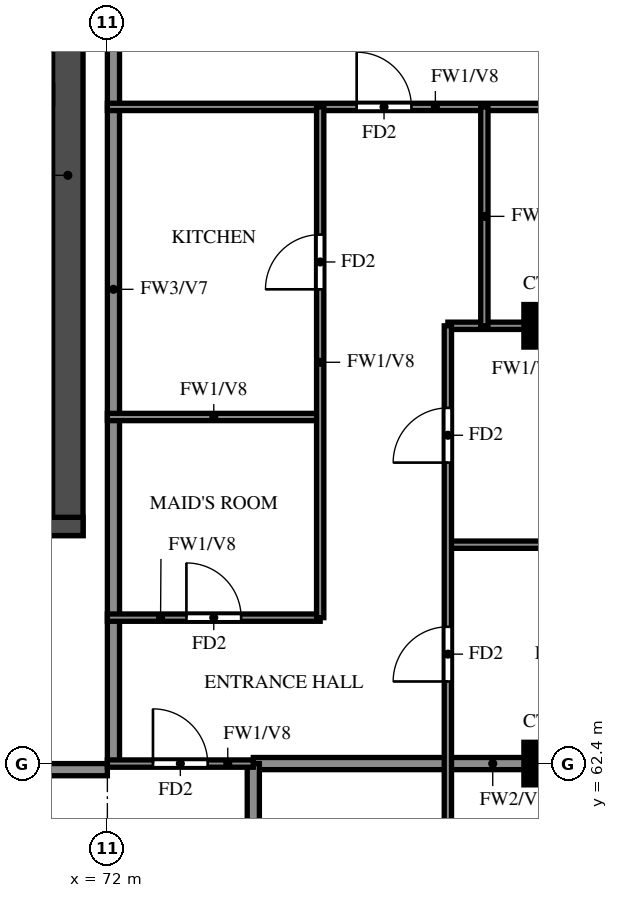
"""IFC4 building model, lengths in metres.
Left out: names, types, materials, properties, quantities, classifications, styles, units other than length and angle.
Written with IfcOpenShell. Run it as: python <this file> out.ifc"""

import sys

from ifc_helpers import new_model, si_unit, direction, frame, frame_2d, origin, origin_2d, place, context, subcontext, project, spatial, rectangle, extrude, source, transform, mapped, element, fill, save


model = new_model("IFC4")
c1 = context("Model", 3, precision=1e-05, world=origin(), true_north=direction((0.0, 1.0)))
c2 = subcontext(c1, "Body", "Model", "MODEL_VIEW")
j1 = project(units=[si_unit("LENGTHUNIT", "METRE"), si_unit("PLANEANGLEUNIT", "RADIAN")], contexts=[c1])
p1 = place(None, origin())
s1 = spatial("IfcSite", under=j1, at=p1, CompositionType="ELEMENT")
p2 = place(p1, origin())
s2 = spatial("IfcBuilding", under=s1, at=p2, CompositionType="ELEMENT")
p3 = place(p2, frame((0.0, 0.0, 267.5)))
s3 = spatial("IfcBuildingStorey", under=s2, at=p3, CompositionType="ELEMENT", Elevation=267.5)
m1 = source(origin(), c2, "Body", "SweptSolid", [
    extrude(rectangle(XDim=0.7, YDim=0.7, at=origin_2d()), origin(), (0.0, 0.0, 1.0), 3.099),
])
for number, where, z_axis, x_axis in (
    (1, (79.2, 62.4, 0.0), (0.0, 0.0, 1.0), (1.0, 0.0, 0.0)),
    (2, (79.2, 69.6, 0.0), (0.0, 0.0, 1.0), (1.0, 0.0, 0.0)),
):
    element("IfcColumn", number, at=place(p3, frame(where, z_axis=z_axis, x_axis=x_axis)), inside=s3, PredefinedType="COLUMN", context=c2, shape_type="MappedRepresentation", body=[
        mapped(m1, transform((0.0, 0.0, 0.0))),
    ])
p4 = place(p3, frame((71.35, 66.15, 0.0), z_axis=(0.0, 0.0, 1.0), x_axis=(0.0, 1.0, 0.0)))
e3 = element("IfcWall", 3, at=p4, inside=s3, PredefinedType="SHEAR", context=c2, shape_type="SweptSolid", body=[
    extrude(rectangle(XDim=11.85, YDim=0.5, at=frame_2d((5.925, 0.0))), origin(), (0.0, 0.0, 1.0), 3.099),
])
p5 = place(p3, frame((29.2, 66.3, 0.0), z_axis=(0.0, 0.0, 1.0), x_axis=(1.0, 0.0, 0.0)))
e4 = element("IfcWall", 4, at=p5, inside=s3, PredefinedType="SHEAR", context=c2, shape_type="SweptSolid", body=[
    extrude(rectangle(XDim=42.4, YDim=0.3, at=frame_2d((21.2, 0.0))), origin(), (0.0, 0.0, 1.0), 3.099),
])
p6 = place(p5, frame((1.425, 0.0, 0.0)))
e5 = element("IfcOpeningElement", 5, at=p6, cuts=e4, PredefinedType="OPENING", context=c2, shape_type="SweptSolid", body=[
    extrude(rectangle(XDim=1.1, YDim=2.1, at=frame_2d((0.55, 1.05))), frame((0.0, 0.16, 0.0), z_axis=(0.0, -1.0, 0.0), x_axis=(1.0, 0.0, 0.0)), (0.0, 0.0, 1.0), 0.32),
])
p7 = place(p5, frame((4.2, 0.0, 0.0)))
e6 = element("IfcOpeningElement", 6, at=p7, cuts=e4, PredefinedType="OPENING", context=c2, shape_type="SweptSolid", body=[
    extrude(rectangle(XDim=1.8, YDim=2.1, at=frame_2d((0.9, 1.05))), frame((0.0, 0.16, 0.0), z_axis=(0.0, -1.0, 0.0), x_axis=(1.0, 0.0, 0.0)), (0.0, 0.0, 1.0), 0.32),
])
p8 = place(p3, frame((67.2, 62.3, 0.0), z_axis=(0.0, 0.0, 1.0), x_axis=(1.0, 0.0, 0.0)))
e7 = element("IfcWall", 7, at=p8, inside=s3, PredefinedType="SOLIDWALL", context=c2, shape_type="SweptSolid", body=[
    extrude(rectangle(XDim=4.8, YDim=0.2, at=frame_2d((2.4, 0.0))), origin(), (0.0, 0.0, 1.0), 3.099),
])
p9 = place(p3, frame((72.1, 62.4, 0.0), z_axis=(0.0, 0.0, 1.0), x_axis=(0.0, 1.0, 0.0)))
e8 = element("IfcWall", 8, at=p9, inside=s3, PredefinedType="SOLIDWALL", context=c2, shape_type="SweptSolid", body=[
    extrude(rectangle(XDim=15.6, YDim=0.2, at=frame_2d((7.8, 0.0))), origin(), (0.0, 0.0, 1.0), 3.099),
])
p10 = place(p3, frame((74.4, 62.4, 0.0), z_axis=(0.0, 0.0, 1.0), x_axis=(1.0, 0.0, 0.0)))
e9 = element("IfcWall", 9, at=p10, inside=s3, PredefinedType="SOLIDWALL", context=c2, shape_type="SweptSolid", body=[
    extrude(rectangle(XDim=7.875, YDim=0.2, at=frame_2d((3.938, 0.0))), origin(), (0.0, 0.0, 1.0), 3.099),
])
p11 = place(p3, frame((74.4, 60.0, 0.0), z_axis=(0.0, 0.0, 1.0), x_axis=(0.0, 1.0, 0.0)))
e10 = element("IfcWall", 10, at=p11, inside=s3, PredefinedType="SOLIDWALL", context=c2, shape_type="SweptSolid", body=[
    extrude(rectangle(XDim=2.4, YDim=0.2, at=frame_2d((1.2, 0.0))), origin(), (0.0, 0.0, 1.0), 3.099),
])
p12 = place(p3, frame((72.0, 62.4, 0.0), z_axis=(0.0, 0.0, 1.0), x_axis=(1.0, 0.0, 0.0)))
e11 = element("IfcWall", 11, at=p12, inside=s3, PredefinedType="PARTITIONING", context=c2, shape_type="SweptSolid", body=[
    extrude(rectangle(XDim=2.4, YDim=0.12, at=frame_2d((1.2, 0.0))), origin(), (0.0, 0.0, 1.0), 3.099),
])
p13 = place(p12, frame((0.75, 0.0, 0.0)))
e12 = element("IfcOpeningElement", 12, at=p13, cuts=e11, PredefinedType="OPENING", context=c2, shape_type="SweptSolid", body=[
    extrude(rectangle(XDim=0.9, YDim=2.1, at=frame_2d((0.45, 1.05))), frame((0.0, 0.07, 0.0), z_axis=(0.0, -1.0, 0.0), x_axis=(1.0, 0.0, 0.0)), (0.0, 0.0, 1.0), 0.14),
])
p14 = place(p3, frame((72.0, 64.8, 0.0), z_axis=(0.0, 0.0, 1.0), x_axis=(1.0, 0.0, 0.0)))
e13 = element("IfcWall", 13, at=p14, inside=s3, PredefinedType="PARTITIONING", context=c2, shape_type="SweptSolid", body=[
    extrude(rectangle(XDim=3.5, YDim=0.12, at=frame_2d((1.75, 0.0))), origin(), (0.0, 0.0, 1.0), 3.099),
])
p15 = place(p14, frame((1.3, 0.0, 0.0)))
e14 = element("IfcOpeningElement", 14, at=p15, cuts=e13, PredefinedType="OPENING", context=c2, shape_type="SweptSolid", body=[
    extrude(rectangle(XDim=0.9, YDim=2.1, at=frame_2d((0.45, 1.05))), frame((0.0, 0.07, 0.0), z_axis=(0.0, -1.0, 0.0), x_axis=(1.0, 0.0, 0.0)), (0.0, 0.0, 1.0), 0.14),
])
p16 = place(p3, frame((77.6, 66.0, 0.0), z_axis=(0.0, 0.0, 1.0), x_axis=(1.0, 0.0, 0.0)))
e15 = element("IfcWall", 15, at=p16, inside=s3, PredefinedType="PARTITIONING", context=c2, shape_type="SweptSolid", body=[
    extrude(rectangle(XDim=4.675, YDim=0.12, at=frame_2d((2.337, 0.0))), origin(), (0.0, 0.0, 1.0), 3.099),
])
p17 = place(p3, frame((72.0, 68.1, 0.0), z_axis=(0.0, 0.0, 1.0), x_axis=(1.0, 0.0, 0.0)))
e16 = element("IfcWall", 16, at=p17, inside=s3, PredefinedType="PARTITIONING", context=c2, shape_type="SweptSolid", body=[
    extrude(rectangle(XDim=3.5, YDim=0.12, at=frame_2d((1.75, 0.0))), origin(), (0.0, 0.0, 1.0), 3.099),
])
p18 = place(p3, frame((77.6, 69.6, 0.0), z_axis=(0.0, 0.0, 1.0), x_axis=(1.0, 0.0, 0.0)))
e17 = element("IfcWall", 17, at=p18, inside=s3, PredefinedType="PARTITIONING", context=c2, shape_type="SweptSolid", body=[
    extrude(rectangle(XDim=4.675, YDim=0.12, at=frame_2d((2.337, 0.0))), origin(), (0.0, 0.0, 1.0), 3.099),
])
p19 = place(p18, frame((2.337, 0.0, 0.0)))
e18 = element("IfcOpeningElement", 18, at=p19, cuts=e17, PredefinedType="OPENING", context=c2, shape_type="SweptSolid", body=[
    extrude(rectangle(XDim=0.8, YDim=2.1, at=frame_2d((0.4, 1.05))), frame((0.0, 0.07, 0.0), z_axis=(0.0, -1.0, 0.0), x_axis=(1.0, 0.0, 0.0)), (0.0, 0.0, 1.0), 0.14),
])
p20 = place(p3, frame((72.0, 73.2, 0.0), z_axis=(0.0, 0.0, 1.0), x_axis=(1.0, 0.0, 0.0)))
e19 = element("IfcWall", 19, at=p20, inside=s3, PredefinedType="PARTITIONING", context=c2, shape_type="SweptSolid", body=[
    extrude(rectangle(XDim=10.275, YDim=0.12, at=frame_2d((5.137, 0.0))), origin(), (0.0, 0.0, 1.0), 3.099),
])
p21 = place(p20, frame((4.1, 0.0, 0.0)))
e20 = element("IfcOpeningElement", 20, at=p21, cuts=e19, PredefinedType="OPENING", context=c2, shape_type="SweptSolid", body=[
    extrude(rectangle(XDim=0.9, YDim=2.1, at=frame_2d((0.45, 1.05))), frame((0.0, 0.07, 0.0), z_axis=(0.0, -1.0, 0.0), x_axis=(1.0, 0.0, 0.0)), (0.0, 0.0, 1.0), 0.14),
])
p22 = place(p3, frame((75.5, 64.8, 0.0), z_axis=(0.0, 0.0, 1.0), x_axis=(0.0, 1.0, 0.0)))
e21 = element("IfcWall", 21, at=p22, inside=s3, PredefinedType="PARTITIONING", context=c2, shape_type="SweptSolid", body=[
    extrude(rectangle(XDim=8.4, YDim=0.12, at=frame_2d((4.2, 0.0))), origin(), (0.0, 0.0, 1.0), 3.099),
])
p23 = place(p22, frame((5.4, 0.0, 0.0)))
e22 = element("IfcOpeningElement", 22, at=p23, cuts=e21, PredefinedType="OPENING", context=c2, shape_type="SweptSolid", body=[
    extrude(rectangle(XDim=0.9, YDim=2.1, at=frame_2d((0.45, 1.05))), frame((0.0, 0.07, 0.0), z_axis=(0.0, -1.0, 0.0), x_axis=(1.0, 0.0, 0.0)), (0.0, 0.0, 1.0), 0.14),
])
p24 = place(p3, frame((77.6, 48.125, 0.0), z_axis=(0.0, 0.0, 1.0), x_axis=(0.0, 1.0, 0.0)))
e23 = element("IfcWall", 23, at=p24, inside=s3, PredefinedType="PARTITIONING", context=c2, shape_type="SweptSolid", body=[
    extrude(rectangle(XDim=21.475, YDim=0.12, at=frame_2d((10.738, 0.0))), origin(), (0.0, 0.0, 1.0), 3.099),
])
p25 = place(p24, frame((1.288, 0.0, 0.0)))
e24 = element("IfcOpeningElement", 24, at=p25, cuts=e23, PredefinedType="OPENING", context=c2, shape_type="SweptSolid", body=[
    extrude(rectangle(XDim=0.9, YDim=2.1, at=frame_2d((0.45, 1.05))), frame((0.0, 0.07, 0.0), z_axis=(0.0, -1.0, 0.0), x_axis=(1.0, 0.0, 0.0)), (0.0, 0.0, 1.0), 0.14),
])
p26 = place(p24, frame((7.825, 0.0, 0.0)))
e25 = element("IfcOpeningElement", 25, at=p26, cuts=e23, PredefinedType="OPENING", context=c2, shape_type="SweptSolid", body=[
    extrude(rectangle(XDim=1.5, YDim=2.1, at=frame_2d((0.75, 1.05))), frame((0.0, 0.07, 0.0), z_axis=(0.0, -1.0, 0.0), x_axis=(1.0, 0.0, 0.0)), (0.0, 0.0, 1.0), 0.14),
])
p27 = place(p24, frame((12.025, 0.0, 0.0)))
e26 = element("IfcOpeningElement", 26, at=p27, cuts=e23, PredefinedType="OPENING", context=c2, shape_type="SweptSolid", body=[
    extrude(rectangle(XDim=0.9, YDim=2.1, at=frame_2d((0.45, 1.05))), frame((0.0, 0.07, 0.0), z_axis=(0.0, -1.0, 0.0), x_axis=(1.0, 0.0, 0.0)), (0.0, 0.0, 1.0), 0.14),
])
p28 = place(p24, frame((15.625, 0.0, 0.0)))
e27 = element("IfcOpeningElement", 27, at=p28, cuts=e23, PredefinedType="OPENING", context=c2, shape_type="SweptSolid", body=[
    extrude(rectangle(XDim=0.9, YDim=2.1, at=frame_2d((0.45, 1.05))), frame((0.0, 0.07, 0.0), z_axis=(0.0, -1.0, 0.0), x_axis=(1.0, 0.0, 0.0)), (0.0, 0.0, 1.0), 0.14),
])
p29 = place(p24, frame((19.225, 0.0, 0.0)))
e28 = element("IfcOpeningElement", 28, at=p29, cuts=e23, PredefinedType="OPENING", context=c2, shape_type="SweptSolid", body=[
    extrude(rectangle(XDim=0.9, YDim=2.1, at=frame_2d((0.45, 1.05))), frame((0.0, 0.07, 0.0), z_axis=(0.0, -1.0, 0.0), x_axis=(1.0, 0.0, 0.0)), (0.0, 0.0, 1.0), 0.14),
])
p30 = place(p3, frame((78.2, 69.6, 0.0), z_axis=(0.0, 0.0, 1.0), x_axis=(0.0, 1.0, 0.0)))
e29 = element("IfcWall", 29, at=p30, inside=s3, PredefinedType="PARTITIONING", context=c2, shape_type="SweptSolid", body=[
    extrude(rectangle(XDim=3.6, YDim=0.12, at=frame_2d((1.8, 0.0))), origin(), (0.0, 0.0, 1.0), 3.099),
])
p31 = place(p13, origin())
e30 = element("IfcDoor", 30, at=p31, inside=s3, OperationType="SINGLE_SWING_LEFT", PredefinedType="DOOR", context=c2, shape_type="SweptSolid", body=[
    extrude(rectangle(XDim=0.9, YDim=2.1, at=frame_2d((0.45, 1.05))), frame((0.0, 0.025, 0.0), z_axis=(0.0, -1.0, 0.0), x_axis=(1.0, 0.0, 0.0)), (0.0, 0.0, 1.0), 0.05),
])
fill(e12, e30)
p32 = place(p28, origin())
e31 = element("IfcDoor", 31, at=p32, inside=s3, OperationType="SINGLE_SWING_LEFT", PredefinedType="DOOR", context=c2, shape_type="SweptSolid", body=[
    extrude(rectangle(XDim=0.9, YDim=2.1, at=frame_2d((0.45, 1.05))), frame((0.0, 0.025, 0.0), z_axis=(0.0, -1.0, 0.0), x_axis=(1.0, 0.0, 0.0)), (0.0, 0.0, 1.0), 0.05),
])
fill(e27, e31)
p33 = place(p29, origin())
e32 = element("IfcDoor", 32, at=p33, inside=s3, OperationType="SINGLE_SWING_LEFT", PredefinedType="DOOR", context=c2, shape_type="SweptSolid", body=[
    extrude(rectangle(XDim=0.9, YDim=2.1, at=frame_2d((0.45, 1.05))), frame((0.0, 0.025, 0.0), z_axis=(0.0, -1.0, 0.0), x_axis=(1.0, 0.0, 0.0)), (0.0, 0.0, 1.0), 0.05),
])
fill(e28, e32)
p34 = place(p21, origin())
e33 = element("IfcDoor", 33, at=p34, inside=s3, OperationType="SINGLE_SWING_LEFT", PredefinedType="DOOR", context=c2, shape_type="SweptSolid", body=[
    extrude(rectangle(XDim=0.9, YDim=2.1, at=frame_2d((0.45, 1.05))), frame((0.0, 0.025, 0.0), z_axis=(0.0, -1.0, 0.0), x_axis=(1.0, 0.0, 0.0)), (0.0, 0.0, 1.0), 0.05),
])
fill(e20, e33)
p35 = place(p15, origin())
e34 = element("IfcDoor", 34, at=p35, inside=s3, OperationType="SINGLE_SWING_LEFT", PredefinedType="DOOR", context=c2, shape_type="SweptSolid", body=[
    extrude(rectangle(XDim=0.9, YDim=2.1, at=frame_2d((0.45, 1.05))), frame((0.0, 0.025, 0.0), z_axis=(0.0, -1.0, 0.0), x_axis=(1.0, 0.0, 0.0)), (0.0, 0.0, 1.0), 0.05),
])
fill(e14, e34)
p36 = place(p23, origin())
e35 = element("IfcDoor", 35, at=p36, inside=s3, OperationType="SINGLE_SWING_RIGHT", PredefinedType="DOOR", context=c2, shape_type="SweptSolid", body=[
    extrude(rectangle(XDim=0.9, YDim=2.1, at=frame_2d((0.45, 1.05))), frame((0.0, 0.025, 0.0), z_axis=(0.0, -1.0, 0.0), x_axis=(1.0, 0.0, 0.0)), (0.0, 0.0, 1.0), 0.05),
])
fill(e22, e35)
save(model, sys.argv[1])
